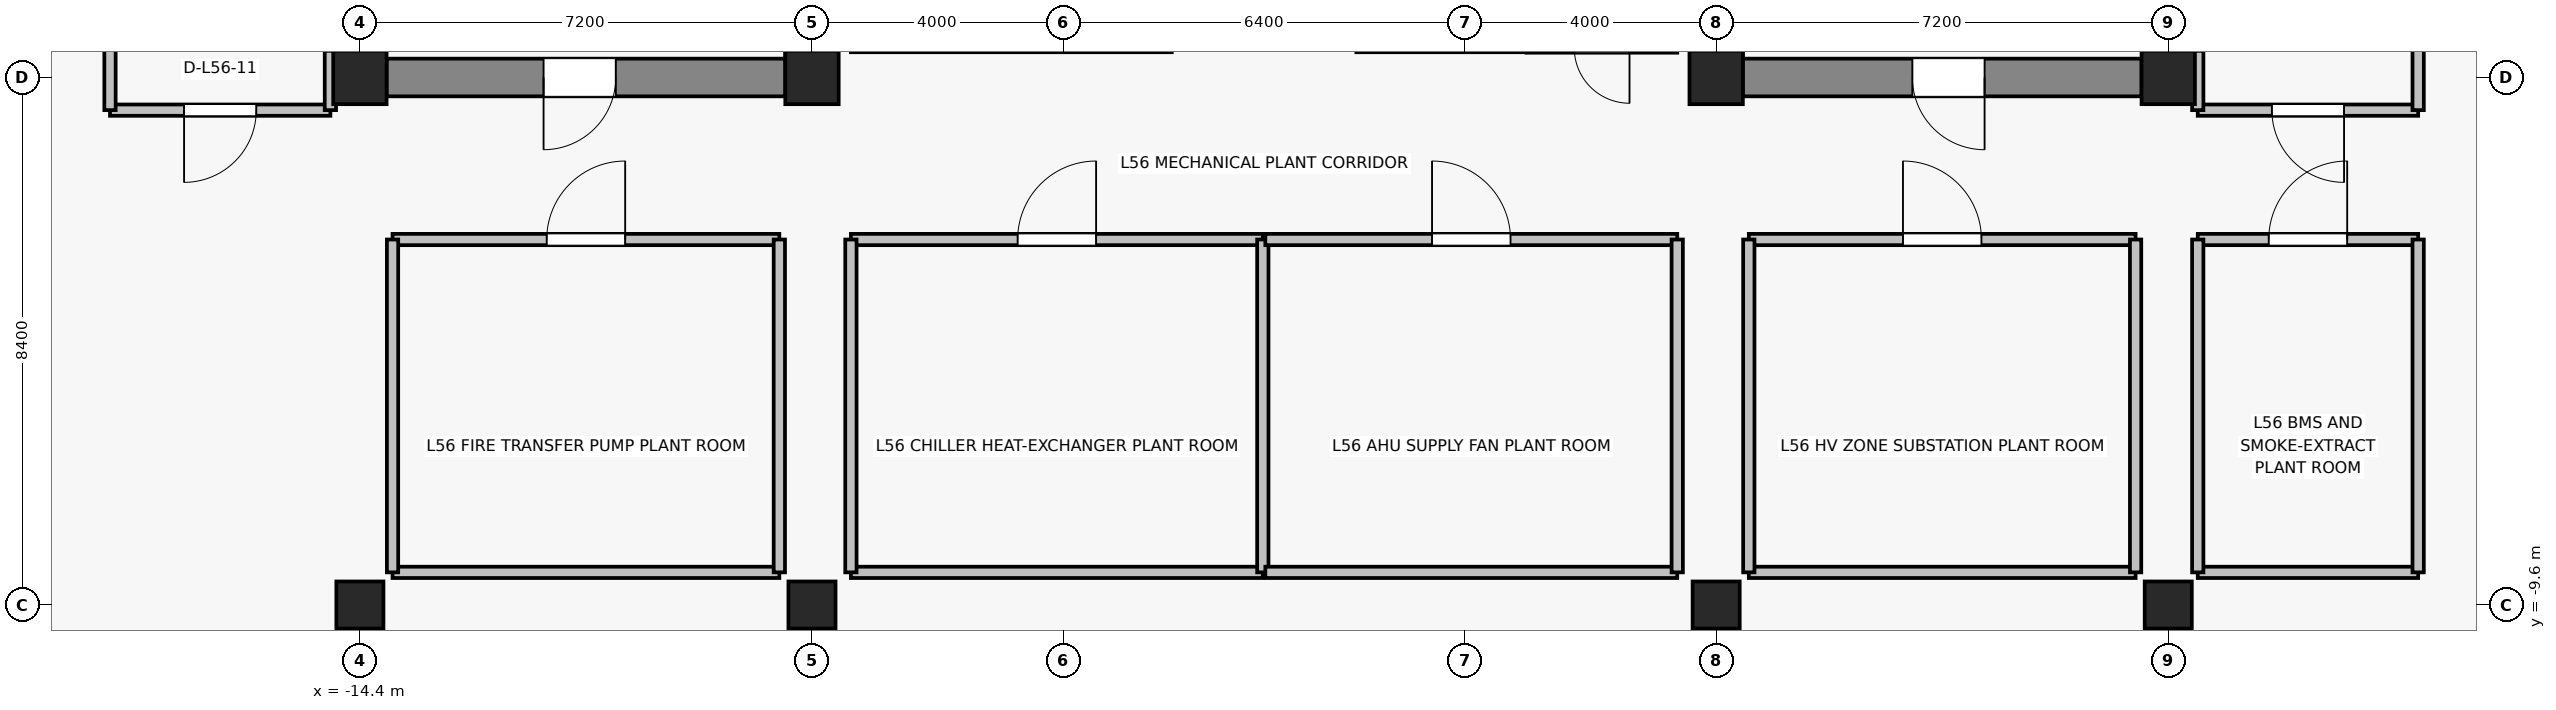
"""IFC4 building model, lengths in metres.
Left out: names, types, materials, properties, quantities, classifications, styles, units other than length and angle.
Written with IfcOpenShell. Run it as: python <this file> out.ifc"""

import sys

from ifc_helpers import new_model, si_unit, direction, frame, frame_2d, origin, origin_2d, place, context, subcontext, project, spatial, rectangle, extrude, source, transform, mapped, element, fill, save


model = new_model("IFC4")
c1 = context("Model", 3, precision=1e-05, world=origin(), true_north=direction((0.0, 1.0)))
c2 = subcontext(c1, "Body", "Model", "MODEL_VIEW")
j1 = project(units=[si_unit("LENGTHUNIT", "METRE"), si_unit("PLANEANGLEUNIT", "RADIAN")], contexts=[c1])
p1 = place(None, origin())
s1 = spatial("IfcSite", under=j1, at=p1, CompositionType="ELEMENT")
p2 = place(p1, origin())
s2 = spatial("IfcBuilding", under=s1, at=p2, CompositionType="ELEMENT")
p3 = place(p2, frame((0.0, 0.0, 199.0)))
s3 = spatial("IfcBuildingStorey", under=s2, at=p3, CompositionType="ELEMENT", Elevation=199.0)
for number, where, z_axis, x_axis in (
    (1, (-14.4, -1.2, 0.0), (0.0, 0.0, 1.0), (1.0, 0.0, 0.0)),
    (2, (-7.2, -1.2, 0.0), (0.0, 0.0, 1.0), (1.0, 0.0, 0.0)),
    (3, (7.2, -1.2, 0.0), (0.0, 0.0, 1.0), (1.0, 0.0, 0.0)),
    (4, (14.4, -1.2, 0.0), (0.0, 0.0, 1.0), (1.0, 0.0, 0.0)),
):
    element("IfcColumn", number, at=place(p3, frame(where, z_axis=z_axis, x_axis=x_axis)), inside=s3, PredefinedType="COLUMN", context=c2, shape_type="SweptSolid", body=[
        extrude(rectangle(XDim=0.85, YDim=0.85, at=origin_2d()), origin(), (0.0, 0.0, 1.0), 6.6),
    ])
for number, where, z_axis, x_axis in (
    (5, (-14.4, -9.6, 0.0), (0.0, 0.0, 1.0), (1.0, 0.0, 0.0)),
    (6, (-7.2, -9.6, 0.0), (0.0, 0.0, 1.0), (1.0, 0.0, 0.0)),
    (7, (7.2, -9.6, 0.0), (0.0, 0.0, 1.0), (1.0, 0.0, 0.0)),
    (8, (14.4, -9.6, 0.0), (0.0, 0.0, 1.0), (1.0, 0.0, 0.0)),
):
    element("IfcColumn", number, at=place(p3, frame(where, z_axis=z_axis, x_axis=x_axis)), inside=s3, PredefinedType="COLUMN", context=c2, shape_type="SweptSolid", body=[
        extrude(rectangle(XDim=0.75, YDim=0.75, at=origin_2d()), origin(), (0.0, 0.0, 1.0), 6.6),
    ])
p4 = place(p3, frame((-7.625, -1.2, 0.0), z_axis=(0.0, 0.0, 1.0), x_axis=(-1.0, 0.0, 0.0)))
e9 = element("IfcWall", 9, at=p4, inside=s3, PredefinedType="SHEAR", context=c2, shape_type="SweptSolid", body=[
    extrude(rectangle(XDim=6.35, YDim=0.6, at=frame_2d((3.175, 0.0))), origin(), (0.0, 0.0, 1.0), 6.35),
])
p5 = place(p4, frame((2.7, 0.0, 0.0)))
e10 = element("IfcOpeningElement", 10, at=p5, cuts=e9, PredefinedType="OPENING", context=c2, shape_type="SweptSolid", body=[
    extrude(rectangle(XDim=1.15, YDim=2.15, at=frame_2d((0.575, 1.075))), frame((0.0, 0.31, 0.0), z_axis=(0.0, -1.0, 0.0), x_axis=(1.0, 0.0, 0.0)), (0.0, 0.0, 1.0), 0.62),
])
p6 = place(p3, frame((13.975, -1.2, 0.0), z_axis=(0.0, 0.0, 1.0), x_axis=(-1.0, 0.0, 0.0)))
e11 = element("IfcWall", 11, at=p6, inside=s3, PredefinedType="SHEAR", context=c2, shape_type="SweptSolid", body=[
    extrude(rectangle(XDim=6.35, YDim=0.6, at=frame_2d((3.175, 0.0))), origin(), (0.0, 0.0, 1.0), 6.35),
])
p7 = place(p6, frame((2.5, 0.0, 0.0)))
e12 = element("IfcOpeningElement", 12, at=p7, cuts=e11, PredefinedType="OPENING", context=c2, shape_type="SweptSolid", body=[
    extrude(rectangle(XDim=1.15, YDim=2.15, at=frame_2d((0.575, 1.075))), frame((0.0, 0.31, 0.0), z_axis=(0.0, -1.0, 0.0), x_axis=(1.0, 0.0, 0.0)), (0.0, 0.0, 1.0), 0.62),
])
for number, where, z_axis, x_axis in (
    (13, (-7.4, -0.9, 0.0), (0.0, 0.0, 1.0), (0.0, 1.0, 0.0)),
    (14, (7.4, -0.9, 0.0), (0.0, 0.0, 1.0), (0.0, 1.0, 0.0)),
):
    element("IfcWall", number, at=place(p3, frame(where, z_axis=z_axis, x_axis=x_axis)), inside=s3, PredefinedType="SHEAR", context=c2, shape_type="SweptSolid", body=[
        extrude(rectangle(XDim=4.15, YDim=0.45, at=frame_2d((2.075, 0.0))), origin(), (0.0, 0.0, 1.0), 6.35),
    ])
p8 = place(p3, frame((6.58, -0.73, 0.0), z_axis=(0.0, 0.0, 1.0), x_axis=(-1.0, 0.0, 0.0)))
e15 = element("IfcWall", 15, at=p8, inside=s3, PredefinedType="PARTITIONING", context=c2, shape_type="SweptSolid", body=[
    extrude(rectangle(XDim=2.4, YDim=0.15, at=frame_2d((1.2, 0.0))), origin(), (0.0, 0.0, 1.0), 6.35),
])
p9 = place(p8, frame((0.76, 0.0, 0.0)))
e16 = element("IfcOpeningElement", 16, at=p9, cuts=e15, PredefinedType="OPENING", context=c2, shape_type="SweptSolid", body=[
    extrude(rectangle(XDim=0.88, YDim=2.1, at=frame_2d((0.44, 1.05))), frame((0.0, 0.085, 0.0), z_axis=(0.0, -1.0, 0.0), x_axis=(1.0, 0.0, 0.0)), (0.0, 0.0, 1.0), 0.17),
])
p10 = place(p3, frame((-14.87, -1.72, 0.0), z_axis=(0.0, 0.0, 1.0), x_axis=(-1.0, 0.0, 0.0)))
e17 = element("IfcWall", 17, at=p10, inside=s3, PredefinedType="PARTITIONING", context=c2, shape_type="SweptSolid", body=[
    extrude(rectangle(XDim=3.51, YDim=0.18, at=frame_2d((1.755, 0.0))), origin(), (0.0, 0.0, 1.0), 6.35),
])
p11 = place(p10, frame((1.18, 0.0, 0.0)))
e18 = element("IfcOpeningElement", 18, at=p11, cuts=e17, PredefinedType="OPENING", context=c2, shape_type="SweptSolid", body=[
    extrude(rectangle(XDim=1.15, YDim=2.15, at=frame_2d((0.575, 1.075))), frame((0.0, 0.1, 0.0), z_axis=(0.0, -1.0, 0.0), x_axis=(1.0, 0.0, 0.0)), (0.0, 0.0, 1.0), 0.2),
])
p12 = place(p3, frame((-18.38, -1.72, 0.0), z_axis=(0.0, 0.0, 1.0), x_axis=(0.0, 1.0, 0.0)))
e19 = element("IfcWall", 19, at=p12, inside=s3, PredefinedType="PARTITIONING", context=c2, shape_type="SweptSolid", body=[
    extrude(rectangle(XDim=7.0, YDim=0.18, at=frame_2d((3.5, 0.0))), origin(), (0.0, 0.0, 1.0), 5.332),
])
p13 = place(p3, frame((-14.87, -0.775, 0.0), z_axis=(0.0, 0.0, 1.0), x_axis=(0.0, -1.0, 0.0)))
e20 = element("IfcWall", 20, at=p13, inside=s3, PredefinedType="PARTITIONING", context=c2, shape_type="SweptSolid", body=[
    extrude(rectangle(XDim=0.945, YDim=0.18, at=frame_2d((0.473, 0.0))), origin(), (0.0, 0.0, 1.0), 5.332),
])
p14 = place(p3, frame((18.38, -1.72, 0.0), z_axis=(0.0, 0.0, 1.0), x_axis=(-1.0, 0.0, 0.0)))
e21 = element("IfcWall", 21, at=p14, inside=s3, PredefinedType="PARTITIONING", context=c2, shape_type="SweptSolid", body=[
    extrude(rectangle(XDim=3.51, YDim=0.18, at=frame_2d((1.755, 0.0))), origin(), (0.0, 0.0, 1.0), 6.35),
])
p15 = place(p14, frame((1.18, 0.0, 0.0)))
e22 = element("IfcOpeningElement", 22, at=p15, cuts=e21, PredefinedType="OPENING", context=c2, shape_type="SweptSolid", body=[
    extrude(rectangle(XDim=1.15, YDim=2.15, at=frame_2d((0.575, 1.075))), frame((0.0, 0.1, 0.0), z_axis=(0.0, -1.0, 0.0), x_axis=(1.0, 0.0, 0.0)), (0.0, 0.0, 1.0), 0.2),
])
p16 = place(p3, frame((14.87, -1.72, 0.0), z_axis=(0.0, 0.0, 1.0), x_axis=(0.0, 1.0, 0.0)))
e23 = element("IfcWall", 23, at=p16, inside=s3, PredefinedType="PARTITIONING", context=c2, shape_type="SweptSolid", body=[
    extrude(rectangle(XDim=0.945, YDim=0.18, at=frame_2d((0.473, 0.0))), origin(), (0.0, 0.0, 1.0), 4.89),
])
p17 = place(p3, frame((18.38, 5.28, 0.0), z_axis=(0.0, 0.0, 1.0), x_axis=(0.0, -1.0, 0.0)))
e24 = element("IfcWall", 24, at=p17, inside=s3, PredefinedType="PARTITIONING", context=c2, shape_type="SweptSolid", body=[
    extrude(rectangle(XDim=7.0, YDim=0.18, at=frame_2d((3.5, 0.0))), origin(), (0.0, 0.0, 1.0), 4.89),
])
p18 = place(p3, frame((-0.02, -9.08, 0.0), z_axis=(0.0, 0.0, 1.0), x_axis=(-1.0, 0.0, 0.0)))
e25 = element("IfcWall", 25, at=p18, inside=s3, PredefinedType="PARTITIONING", context=c2, shape_type="SweptSolid", body=[
    extrude(rectangle(XDim=6.56, YDim=0.18, at=frame_2d((3.28, 0.0))), origin(), (0.0, 0.0, 1.0), 6.35),
])
p19 = place(p3, frame((-6.58, -3.78, 0.0), z_axis=(0.0, 0.0, 1.0), x_axis=(1.0, 0.0, 0.0)))
e26 = element("IfcWall", 26, at=p19, inside=s3, PredefinedType="PARTITIONING", context=c2, shape_type="SweptSolid", body=[
    extrude(rectangle(XDim=6.56, YDim=0.18, at=frame_2d((3.28, 0.0))), origin(), (0.0, 0.0, 1.0), 6.35),
])
p20 = place(p19, frame((2.655, 0.0, 0.0)))
e27 = element("IfcOpeningElement", 27, at=p20, cuts=e26, PredefinedType="OPENING", context=c2, shape_type="SweptSolid", body=[
    extrude(rectangle(XDim=1.25, YDim=2.15, at=frame_2d((0.625, 1.075))), frame((0.0, 0.1, 0.0), z_axis=(0.0, -1.0, 0.0), x_axis=(1.0, 0.0, 0.0)), (0.0, 0.0, 1.0), 0.2),
])
for number, where, z_axis, x_axis in (
    (28, (-6.58, -9.08, 0.0), (0.0, 0.0, 1.0), (0.0, 1.0, 0.0)),
    (29, (-0.02, -3.78, 0.0), (0.0, 0.0, 1.0), (0.0, -1.0, 0.0)),
):
    element("IfcWall", number, at=place(p3, frame(where, z_axis=z_axis, x_axis=x_axis)), inside=s3, PredefinedType="PARTITIONING", context=c2, shape_type="SweptSolid", body=[
        extrude(rectangle(XDim=5.3, YDim=0.18, at=frame_2d((2.65, 0.0))), origin(), (0.0, 0.0, 1.0), 6.35),
    ])
p21 = place(p3, frame((6.58, -9.08, 0.0), z_axis=(0.0, 0.0, 1.0), x_axis=(-1.0, 0.0, 0.0)))
e30 = element("IfcWall", 30, at=p21, inside=s3, PredefinedType="PARTITIONING", context=c2, shape_type="SweptSolid", body=[
    extrude(rectangle(XDim=6.56, YDim=0.18, at=frame_2d((3.28, 0.0))), origin(), (0.0, 0.0, 1.0), 6.35),
])
p22 = place(p3, frame((0.02, -3.78, 0.0), z_axis=(0.0, 0.0, 1.0), x_axis=(1.0, 0.0, 0.0)))
e31 = element("IfcWall", 31, at=p22, inside=s3, PredefinedType="PARTITIONING", context=c2, shape_type="SweptSolid", body=[
    extrude(rectangle(XDim=6.56, YDim=0.18, at=frame_2d((3.28, 0.0))), origin(), (0.0, 0.0, 1.0), 6.35),
])
p23 = place(p22, frame((2.655, 0.0, 0.0)))
e32 = element("IfcOpeningElement", 32, at=p23, cuts=e31, PredefinedType="OPENING", context=c2, shape_type="SweptSolid", body=[
    extrude(rectangle(XDim=1.25, YDim=2.15, at=frame_2d((0.625, 1.075))), frame((0.0, 0.1, 0.0), z_axis=(0.0, -1.0, 0.0), x_axis=(1.0, 0.0, 0.0)), (0.0, 0.0, 1.0), 0.2),
])
p24 = place(p3, frame((6.58, -3.78, 0.0), z_axis=(0.0, 0.0, 1.0), x_axis=(0.0, -1.0, 0.0)))
e33 = element("IfcWall", 33, at=p24, inside=s3, PredefinedType="PARTITIONING", context=c2, shape_type="SweptSolid", body=[
    extrude(rectangle(XDim=5.3, YDim=0.18, at=frame_2d((2.65, 0.0))), origin(), (0.0, 0.0, 1.0), 6.35),
])
p25 = place(p3, frame((-7.72, -9.08, 0.0), z_axis=(0.0, 0.0, 1.0), x_axis=(-1.0, 0.0, 0.0)))
e34 = element("IfcWall", 34, at=p25, inside=s3, PredefinedType="PARTITIONING", context=c2, shape_type="SweptSolid", body=[
    extrude(rectangle(XDim=6.16, YDim=0.18, at=frame_2d((3.08, 0.0))), origin(), (0.0, 0.0, 1.0), 6.35),
])
p26 = place(p3, frame((-13.88, -3.78, 0.0), z_axis=(0.0, 0.0, 1.0), x_axis=(1.0, 0.0, 0.0)))
e35 = element("IfcWall", 35, at=p26, inside=s3, PredefinedType="PARTITIONING", context=c2, shape_type="SweptSolid", body=[
    extrude(rectangle(XDim=6.16, YDim=0.18, at=frame_2d((3.08, 0.0))), origin(), (0.0, 0.0, 1.0), 6.35),
])
p27 = place(p26, frame((2.455, 0.0, 0.0)))
e36 = element("IfcOpeningElement", 36, at=p27, cuts=e35, PredefinedType="OPENING", context=c2, shape_type="SweptSolid", body=[
    extrude(rectangle(XDim=1.25, YDim=2.15, at=frame_2d((0.625, 1.075))), frame((0.0, 0.1, 0.0), z_axis=(0.0, -1.0, 0.0), x_axis=(1.0, 0.0, 0.0)), (0.0, 0.0, 1.0), 0.2),
])
for number, where, z_axis, x_axis in (
    (37, (-13.88, -9.08, 0.0), (0.0, 0.0, 1.0), (0.0, 1.0, 0.0)),
    (38, (-7.72, -3.78, 0.0), (0.0, 0.0, 1.0), (0.0, -1.0, 0.0)),
):
    element("IfcWall", number, at=place(p3, frame(where, z_axis=z_axis, x_axis=x_axis)), inside=s3, PredefinedType="PARTITIONING", context=c2, shape_type="SweptSolid", body=[
        extrude(rectangle(XDim=5.3, YDim=0.18, at=frame_2d((2.65, 0.0))), origin(), (0.0, 0.0, 1.0), 5.98),
    ])
p28 = place(p3, frame((13.88, -9.08, 0.0), z_axis=(0.0, 0.0, 1.0), x_axis=(-1.0, 0.0, 0.0)))
e39 = element("IfcWall", 39, at=p28, inside=s3, PredefinedType="PARTITIONING", context=c2, shape_type="SweptSolid", body=[
    extrude(rectangle(XDim=6.16, YDim=0.18, at=frame_2d((3.08, 0.0))), origin(), (0.0, 0.0, 1.0), 6.35),
])
p29 = place(p3, frame((7.72, -3.78, 0.0), z_axis=(0.0, 0.0, 1.0), x_axis=(1.0, 0.0, 0.0)))
e40 = element("IfcWall", 40, at=p29, inside=s3, PredefinedType="PARTITIONING", context=c2, shape_type="SweptSolid", body=[
    extrude(rectangle(XDim=6.16, YDim=0.18, at=frame_2d((3.08, 0.0))), origin(), (0.0, 0.0, 1.0), 6.35),
])
p30 = place(p29, frame((2.455, 0.0, 0.0)))
e41 = element("IfcOpeningElement", 41, at=p30, cuts=e40, PredefinedType="OPENING", context=c2, shape_type="SweptSolid", body=[
    extrude(rectangle(XDim=1.25, YDim=2.15, at=frame_2d((0.625, 1.075))), frame((0.0, 0.1, 0.0), z_axis=(0.0, -1.0, 0.0), x_axis=(1.0, 0.0, 0.0)), (0.0, 0.0, 1.0), 0.2),
])
for number, where, z_axis, x_axis in (
    (42, (7.72, -9.08, 0.0), (0.0, 0.0, 1.0), (0.0, 1.0, 0.0)),
    (43, (13.88, -3.78, 0.0), (0.0, 0.0, 1.0), (0.0, -1.0, 0.0)),
):
    element("IfcWall", number, at=place(p3, frame(where, z_axis=z_axis, x_axis=x_axis)), inside=s3, PredefinedType="PARTITIONING", context=c2, shape_type="SweptSolid", body=[
        extrude(rectangle(XDim=5.3, YDim=0.18, at=frame_2d((2.65, 0.0))), origin(), (0.0, 0.0, 1.0), 5.98),
    ])
p31 = place(p3, frame((18.38, -9.08, 0.0), z_axis=(0.0, 0.0, 1.0), x_axis=(-1.0, 0.0, 0.0)))
e44 = element("IfcWall", 44, at=p31, inside=s3, PredefinedType="PARTITIONING", context=c2, shape_type="SweptSolid", body=[
    extrude(rectangle(XDim=3.51, YDim=0.18, at=frame_2d((1.755, 0.0))), origin(), (0.0, 0.0, 1.0), 6.35),
])
p32 = place(p3, frame((14.87, -3.78, 0.0), z_axis=(0.0, 0.0, 1.0), x_axis=(1.0, 0.0, 0.0)))
e45 = element("IfcWall", 45, at=p32, inside=s3, PredefinedType="PARTITIONING", context=c2, shape_type="SweptSolid", body=[
    extrude(rectangle(XDim=3.51, YDim=0.18, at=frame_2d((1.755, 0.0))), origin(), (0.0, 0.0, 1.0), 6.35),
])
p33 = place(p32, frame((1.13, 0.0, 0.0)))
e46 = element("IfcOpeningElement", 46, at=p33, cuts=e45, PredefinedType="OPENING", context=c2, shape_type="SweptSolid", body=[
    extrude(rectangle(XDim=1.25, YDim=2.15, at=frame_2d((0.625, 1.075))), frame((0.0, 0.1, 0.0), z_axis=(0.0, -1.0, 0.0), x_axis=(1.0, 0.0, 0.0)), (0.0, 0.0, 1.0), 0.2),
])
for number, where, z_axis, x_axis in (
    (47, (14.87, -9.08, 0.0), (0.0, 0.0, 1.0), (0.0, 1.0, 0.0)),
    (48, (18.38, -3.78, 0.0), (0.0, 0.0, 1.0), (0.0, -1.0, 0.0)),
):
    element("IfcWall", number, at=place(p3, frame(where, z_axis=z_axis, x_axis=x_axis)), inside=s3, PredefinedType="PARTITIONING", context=c2, shape_type="SweptSolid", body=[
        extrude(rectangle(XDim=5.3, YDim=0.18, at=frame_2d((2.65, 0.0))), origin(), (0.0, 0.0, 1.0), 5.94),
    ])
m1 = source(origin(), c2, "Body", "SweptSolid", [
    extrude(rectangle(XDim=1.15, YDim=2.15, at=frame_2d((0.575, 1.075))), frame((0.0, 0.025, 0.0), z_axis=(0.0, -1.0, 0.0), x_axis=(1.0, 0.0, 0.0)), (0.0, 0.0, 1.0), 0.05),
])
p34 = place(p5, origin())
e49 = element("IfcDoor", 49, at=p34, inside=s3, OperationType="SINGLE_SWING_RIGHT", PredefinedType="DOOR", context=c2, shape_type="MappedRepresentation", body=[
    mapped(m1, transform((0.0, 0.0, 0.0), x_axis=(1.0, 0.0, 0.0), y_axis=(0.0, 1.0, 0.0), z_axis=(0.0, 0.0, 1.0), scale=1.0)),
])
fill(e10, e49)
p35 = place(p7, origin())
e50 = element("IfcDoor", 50, at=p35, inside=s3, OperationType="SINGLE_SWING_LEFT", PredefinedType="DOOR", context=c2, shape_type="MappedRepresentation", body=[
    mapped(m1, transform((0.0, 0.0, 0.0), x_axis=(1.0, 0.0, 0.0), y_axis=(0.0, 1.0, 0.0), z_axis=(0.0, 0.0, 1.0), scale=1.0)),
])
fill(e12, e50)
p36 = place(p11, origin())
e51 = element("IfcDoor", 51, at=p36, inside=s3, OperationType="SINGLE_SWING_RIGHT", PredefinedType="DOOR", context=c2, shape_type="MappedRepresentation", body=[
    mapped(m1, transform((0.0, 0.0, 0.0), x_axis=(1.0, 0.0, 0.0), y_axis=(0.0, 1.0, 0.0), z_axis=(0.0, 0.0, 1.0), scale=1.0)),
])
fill(e18, e51)
p37 = place(p15, origin())
e52 = element("IfcDoor", 52, at=p37, inside=s3, OperationType="SINGLE_SWING_LEFT", PredefinedType="DOOR", context=c2, shape_type="MappedRepresentation", body=[
    mapped(m1, transform((0.0, 0.0, 0.0), x_axis=(1.0, 0.0, 0.0), y_axis=(0.0, 1.0, 0.0), z_axis=(0.0, 0.0, 1.0), scale=1.0)),
])
fill(e22, e52)
m2 = source(origin(), c2, "Body", "SweptSolid", [
    extrude(rectangle(XDim=1.25, YDim=2.15, at=frame_2d((0.625, 1.075))), frame((0.0, 0.025, 0.0), z_axis=(0.0, -1.0, 0.0), x_axis=(1.0, 0.0, 0.0)), (0.0, 0.0, 1.0), 0.05),
])
p38 = place(p20, origin())
e53 = element("IfcDoor", 53, at=p38, inside=s3, OperationType="SINGLE_SWING_RIGHT", PredefinedType="DOOR", context=c2, shape_type="MappedRepresentation", body=[
    mapped(m2, transform((0.0, 0.0, 0.0), x_axis=(1.0, 0.0, 0.0), y_axis=(0.0, 1.0, 0.0), z_axis=(0.0, 0.0, 1.0), scale=1.0)),
])
fill(e27, e53)
p39 = place(p23, origin())
e54 = element("IfcDoor", 54, at=p39, inside=s3, OperationType="SINGLE_SWING_LEFT", PredefinedType="DOOR", context=c2, shape_type="MappedRepresentation", body=[
    mapped(m2, transform((0.0, 0.0, 0.0), x_axis=(1.0, 0.0, 0.0), y_axis=(0.0, 1.0, 0.0), z_axis=(0.0, 0.0, 1.0), scale=1.0)),
])
fill(e32, e54)
p40 = place(p27, origin())
e55 = element("IfcDoor", 55, at=p40, inside=s3, OperationType="SINGLE_SWING_RIGHT", PredefinedType="DOOR", context=c2, shape_type="MappedRepresentation", body=[
    mapped(m2, transform((0.0, 0.0, 0.0), x_axis=(1.0, 0.0, 0.0), y_axis=(0.0, 1.0, 0.0), z_axis=(0.0, 0.0, 1.0), scale=1.0)),
])
fill(e36, e55)
p41 = place(p30, origin())
e56 = element("IfcDoor", 56, at=p41, inside=s3, OperationType="SINGLE_SWING_LEFT", PredefinedType="DOOR", context=c2, shape_type="MappedRepresentation", body=[
    mapped(m2, transform((0.0, 0.0, 0.0), x_axis=(1.0, 0.0, 0.0), y_axis=(0.0, 1.0, 0.0), z_axis=(0.0, 0.0, 1.0), scale=1.0)),
])
fill(e41, e56)
p42 = place(p33, origin())
e57 = element("IfcDoor", 57, at=p42, inside=s3, OperationType="SINGLE_SWING_RIGHT", PredefinedType="DOOR", context=c2, shape_type="MappedRepresentation", body=[
    mapped(m2, transform((0.0, 0.0, 0.0), x_axis=(1.0, 0.0, 0.0), y_axis=(0.0, 1.0, 0.0), z_axis=(0.0, 0.0, 1.0), scale=1.0)),
])
fill(e46, e57)
save(model, sys.argv[1])
